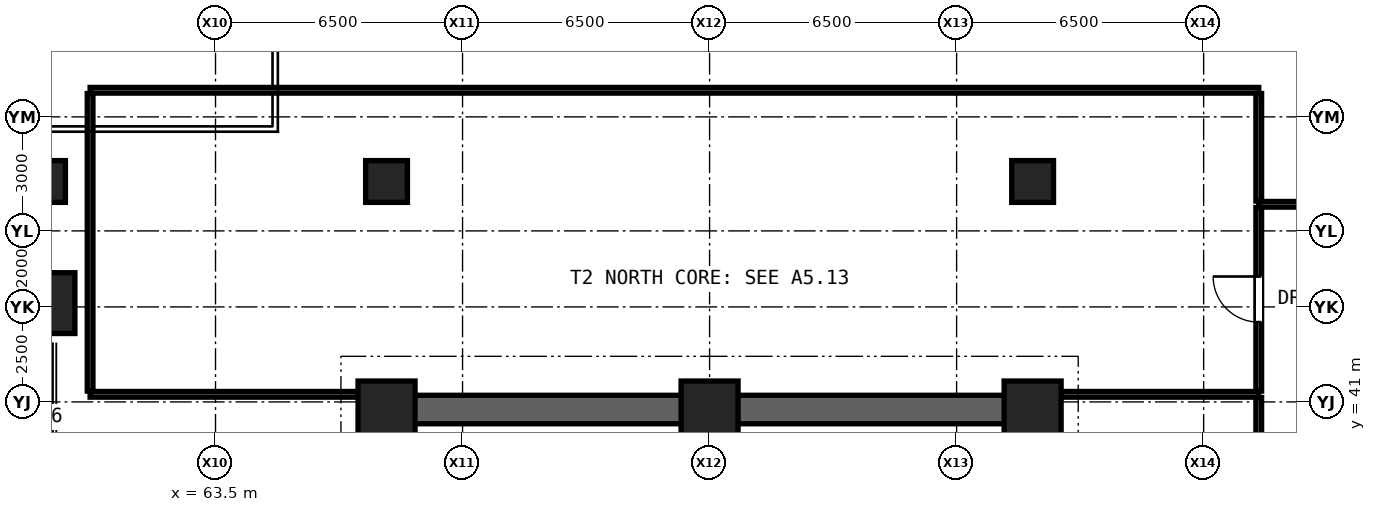
"""IFC4 building model, lengths in metres.
Left out: names, types, materials, properties, quantities, classifications, styles, units other than length and angle.
Written with IfcOpenShell. Run it as: python <this file> out.ifc"""

import sys

from ifc_helpers import new_model, si_unit, direction, frame, frame_2d, origin, origin_2d, place, context, subcontext, project, spatial, rectangle, extrude, element, fill, save


model = new_model("IFC4")
c1 = context("Model", 3, precision=1e-05, world=origin(), true_north=direction((0.0, 1.0)))
c2 = subcontext(c1, "Body", "Model", "MODEL_VIEW")
j1 = project(units=[si_unit("LENGTHUNIT", "METRE"), si_unit("PLANEANGLEUNIT", "RADIAN")], contexts=[c1])
p1 = place(None, origin())
s1 = spatial("IfcSite", under=j1, at=p1, CompositionType="ELEMENT")
p2 = place(p1, origin())
s2 = spatial("IfcBuilding", under=s1, at=p2, CompositionType="ELEMENT")
p3 = place(p2, frame((0.0, 0.0, 5.2)))
s3 = spatial("IfcBuildingStorey", under=s2, at=p3, CompositionType="ELEMENT", Elevation=5.2)
for number, where, z_axis, x_axis in (
    (1, (68.0, 40.8, 0.0), (0.0, 0.0, 1.0), (1.0, 0.0, 0.0)),
    (2, (76.5, 40.8, 0.0), (0.0, 0.0, 1.0), (1.0, 0.0, 0.0)),
    (3, (85.0, 40.8, 0.0), (0.0, 0.0, 1.0), (1.0, 0.0, 0.0)),
):
    element("IfcColumn", number, at=place(p3, frame(where, z_axis=z_axis, x_axis=x_axis)), inside=s3, PredefinedType="COLUMN", context=c2, shape_type="SweptSolid", body=[
        extrude(rectangle(XDim=1.5, YDim=1.5, at=origin_2d()), origin(), (0.0, 0.0, 1.0), 4.3),
    ])
p4 = place(p3, frame((68.0, 40.8, 0.0), z_axis=(0.0, 0.0, 1.0), x_axis=(1.0, 0.0, 0.0)))
e4 = element("IfcWall", 4, at=p4, inside=s3, PredefinedType="SHEAR", context=c2, shape_type="SweptSolid", body=[
    extrude(rectangle(XDim=17.0, YDim=0.75, at=frame_2d((8.5, 0.0))), origin(), (0.0, 0.0, 1.0), 3.98),
])
for number, where, z_axis, x_axis in (
    (5, (68.0, 35.2, 0.0), (0.0, 0.0, 1.0), (0.0, 1.0, 0.0)),
    (6, (85.0, 35.2, 0.0), (0.0, 0.0, 1.0), (0.0, 1.0, 0.0)),
):
    element("IfcWall", number, at=place(p3, frame(where, z_axis=z_axis, x_axis=x_axis)), inside=s3, PredefinedType="SHEAR", context=c2, shape_type="SweptSolid", body=[
        extrude(rectangle(XDim=5.6, YDim=0.75, at=frame_2d((2.8, 0.0))), origin(), (0.0, 0.0, 1.0), 3.98),
    ])
p5 = place(p3, frame((59.0, 43.6, 0.0), z_axis=(0.0, 0.0, 1.0), x_axis=(1.0, 0.0, 0.0)))
e7 = element("IfcColumn", 7, at=p5, inside=s3, PredefinedType="COLUMN", context=c2, shape_type="SweptSolid", body=[
    extrude(rectangle(XDim=1.6, YDim=1.6, at=origin_2d()), origin(), (0.0, 0.0, 1.0), 4.3),
])
for number, where, z_axis, x_axis in (
    (8, (59.0, 46.8, 0.0), (0.0, 0.0, 1.0), (1.0, 0.0, 0.0)),
    (9, (68.0, 46.8, 0.0), (0.0, 0.0, 1.0), (1.0, 0.0, 0.0)),
    (10, (85.0, 46.8, 0.0), (0.0, 0.0, 1.0), (1.0, 0.0, 0.0)),
):
    element("IfcColumn", number, at=place(p3, frame(where, z_axis=z_axis, x_axis=x_axis)), inside=s3, PredefinedType="COLUMN", context=c2, shape_type="SweptSolid", body=[
        extrude(rectangle(XDim=1.1, YDim=1.1, at=origin_2d()), origin(), (0.0, 0.0, 1.0), 4.3),
    ])
p6 = place(p3, frame((60.2, 41.2, 0.0), z_axis=(0.0, 0.0, 1.0), x_axis=(1.0, 0.0, 0.0)))
e11 = element("IfcWall", 11, at=p6, inside=s3, PredefinedType="PARTITIONING", context=c2, shape_type="SweptSolid", body=[
    extrude(rectangle(XDim=7.78, YDim=0.15, at=frame_2d((3.89, 0.0))), origin(), (0.0, 0.0, 1.0), 3.024),
])
p7 = place(p3, frame((85.02, 41.2, 0.0), z_axis=(0.0, 0.0, 1.0), x_axis=(1.0, 0.0, 0.0)))
e12 = element("IfcWall", 12, at=p7, inside=s3, PredefinedType="PARTITIONING", context=c2, shape_type="SweptSolid", body=[
    extrude(rectangle(XDim=5.93, YDim=0.15, at=frame_2d((2.965, 0.0))), origin(), (0.0, 0.0, 1.0), 3.116),
])
p8 = place(p3, frame((90.95, 46.2, 0.0), z_axis=(0.0, 0.0, 1.0), x_axis=(1.0, 0.0, 0.0)))
e13 = element("IfcWall", 13, at=p8, inside=s3, PredefinedType="PARTITIONING", context=c2, shape_type="SweptSolid", body=[
    extrude(rectangle(XDim=1.7, YDim=0.15, at=frame_2d((0.85, 0.0))), origin(), (0.0, 0.0, 1.0), 3.98),
])
p9 = place(p3, frame((60.2, 49.2, 0.0), z_axis=(0.0, 0.0, 1.0), x_axis=(1.0, 0.0, 0.0)))
e14 = element("IfcWall", 14, at=p9, inside=s3, PredefinedType="PARTITIONING", context=c2, shape_type="SweptSolid", body=[
    extrude(rectangle(XDim=30.75, YDim=0.15, at=frame_2d((15.375, 0.0))), origin(), (0.0, 0.0, 1.0), 3.98),
])
p10 = place(p3, frame((60.2, 41.285, 0.0), z_axis=(0.0, 0.0, 1.0), x_axis=(0.0, 1.0, 0.0)))
e15 = element("IfcWall", 15, at=p10, inside=s3, PredefinedType="PARTITIONING", context=c2, shape_type="SweptSolid", body=[
    extrude(rectangle(XDim=7.83, YDim=0.15, at=frame_2d((3.915, 0.0))), origin(), (0.0, 0.0, 1.0), 3.024),
])
p11 = place(p3, frame((90.95, 31.985, 0.0), z_axis=(0.0, 0.0, 1.0), x_axis=(0.0, 1.0, 0.0)))
e16 = element("IfcWall", 16, at=p11, inside=s3, PredefinedType="PARTITIONING", context=c2, shape_type="SweptSolid", body=[
    extrude(rectangle(XDim=9.13, YDim=0.15, at=frame_2d((4.565, 0.0))), origin(), (0.0, 0.0, 1.0), 3.116),
])
p12 = place(p3, frame((90.95, 41.285, 0.0), z_axis=(0.0, 0.0, 1.0), x_axis=(0.0, 1.0, 0.0)))
e17 = element("IfcWall", 17, at=p12, inside=s3, PredefinedType="PARTITIONING", context=c2, shape_type="SweptSolid", body=[
    extrude(rectangle(XDim=4.83, YDim=0.15, at=frame_2d((2.415, 0.0))), origin(), (0.0, 0.0, 1.0), 3.98),
])
p13 = place(p12, frame((1.815, 0.0, 0.0)))
e18 = element("IfcOpeningElement", 18, at=p13, cuts=e17, PredefinedType="OPENING", context=c2, shape_type="SweptSolid", body=[
    extrude(rectangle(XDim=1.2, YDim=2.25, at=frame_2d((0.6, 1.125))), frame((0.0, 0.085, 0.0), z_axis=(0.0, -1.0, 0.0), x_axis=(1.0, 0.0, 0.0)), (0.0, 0.0, 1.0), 0.17),
])
p14 = place(p3, frame((90.95, 46.285, 0.0), z_axis=(0.0, 0.0, 1.0), x_axis=(0.0, 1.0, 0.0)))
e19 = element("IfcWall", 19, at=p14, inside=s3, PredefinedType="PARTITIONING", context=c2, shape_type="SweptSolid", body=[
    extrude(rectangle(XDim=2.83, YDim=0.15, at=frame_2d((1.415, 0.0))), origin(), (0.0, 0.0, 1.0), 3.98),
])
p15 = place(p13, origin())
e20 = element("IfcDoor", 20, at=p15, inside=s3, OperationType="SINGLE_SWING_RIGHT", PredefinedType="DOOR", context=c2, shape_type="SweptSolid", body=[
    extrude(rectangle(XDim=1.2, YDim=2.25, at=frame_2d((0.6, 1.125))), frame((0.0, 0.025, 0.0), z_axis=(0.0, -1.0, 0.0), x_axis=(1.0, 0.0, 0.0)), (0.0, 0.0, 1.0), 0.05),
])
fill(e18, e20)
save(model, sys.argv[1])
